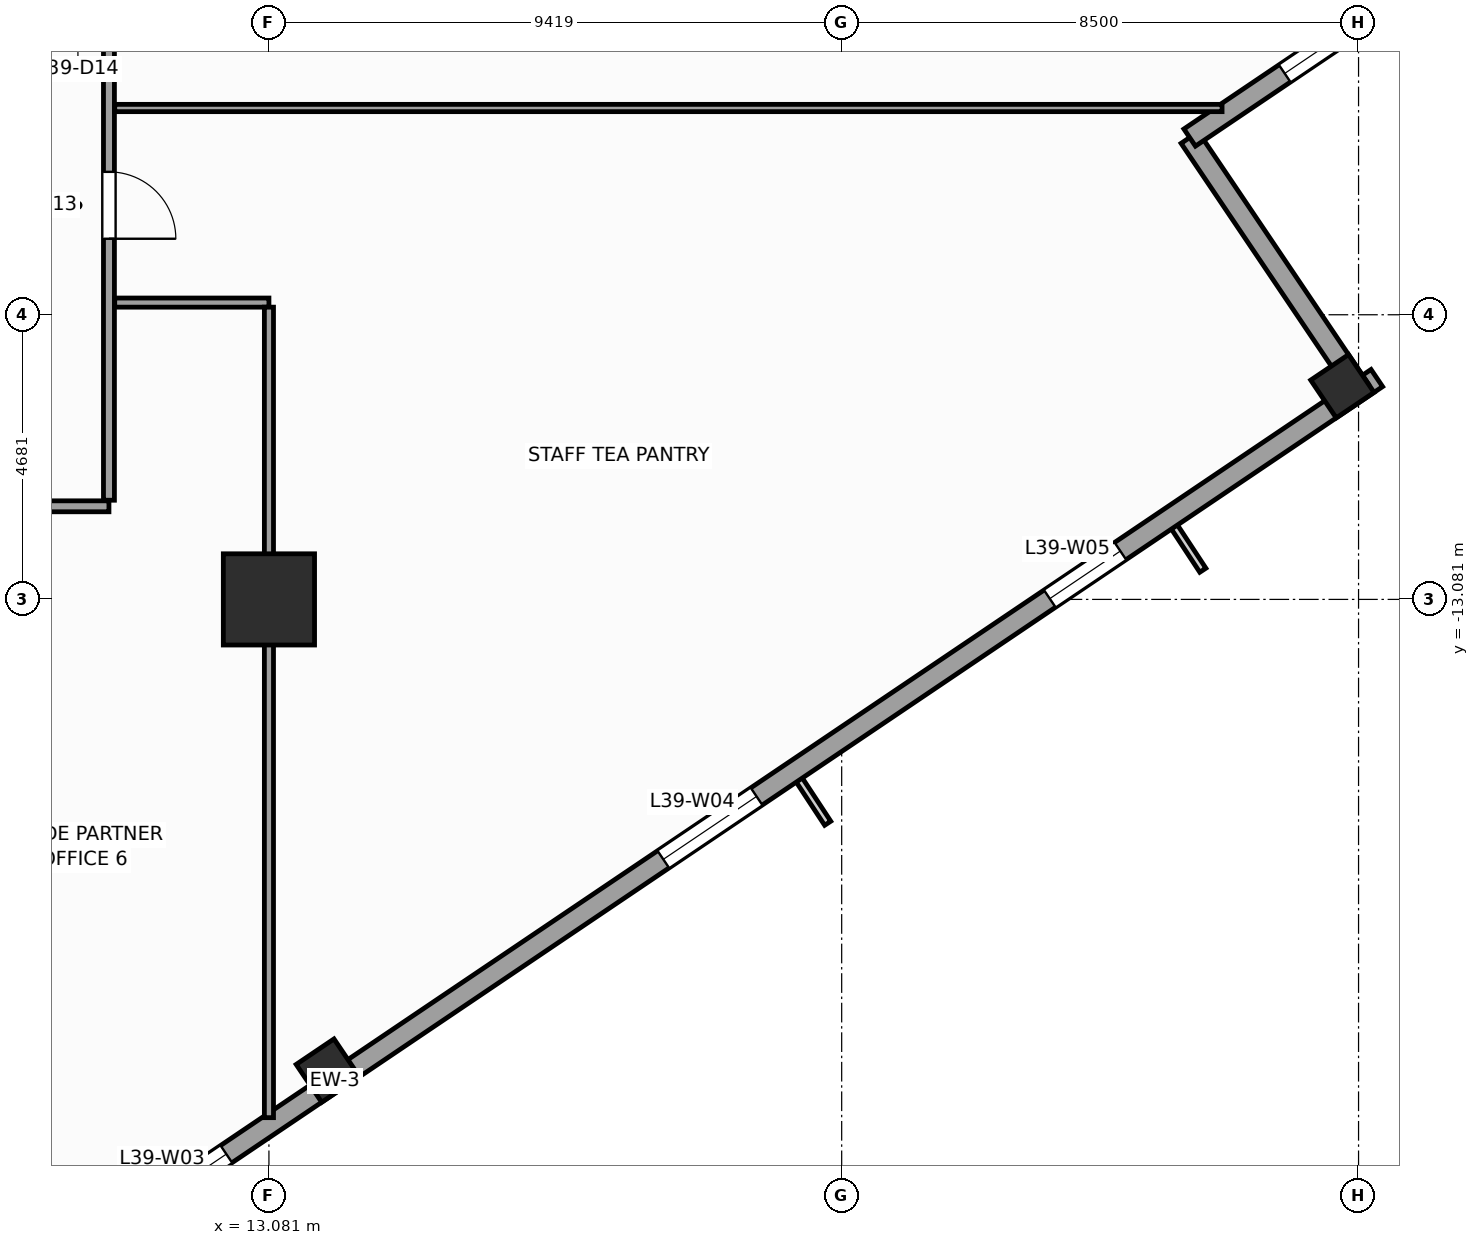
"""IFC4 building model, lengths in metres.
Left out: names, types, materials, properties, quantities, classifications, styles, units other than length and angle.
Written with IfcOpenShell. Run it as: python <this file> out.ifc"""

import sys

from ifc_helpers import new_model, si_unit, direction, frame, frame_2d, origin, origin_2d, place, context, subcontext, project, spatial, rectangle, extrude, source, transform, mapped, element, fill, save


model = new_model("IFC4")
c1 = context("Model", 3, precision=1e-05, world=origin(), true_north=direction((0.0, 1.0)))
c2 = subcontext(c1, "Body", "Model", "MODEL_VIEW")
j1 = project(units=[si_unit("LENGTHUNIT", "METRE"), si_unit("PLANEANGLEUNIT", "RADIAN")], contexts=[c1])
p1 = place(None, origin())
s1 = spatial("IfcSite", under=j1, at=p1, CompositionType="ELEMENT")
p2 = place(p1, origin())
s2 = spatial("IfcBuilding", under=s1, at=p2, CompositionType="ELEMENT")
p3 = place(p2, frame((0.0, 0.0, 164.4)))
s3 = spatial("IfcBuildingStorey", under=s2, at=p3, CompositionType="ELEMENT", Elevation=164.4)
m1 = source(origin(), c2, "Body", "SweptSolid", [
    extrude(rectangle(XDim=1.5, YDim=1.5, at=origin_2d()), origin(), (0.0, 0.0, 1.0), 4.0),
])
p4 = place(p3, frame((13.081, -13.081, 0.0), z_axis=(0.0, 0.0, 1.0), x_axis=(1.0, 0.0, 0.0)))
e1 = element("IfcColumn", 1, at=p4, inside=s3, PredefinedType="COLUMN", context=c2, shape_type="MappedRepresentation", body=[
    mapped(m1, transform((0.0, 0.0, 0.0), scale=1.0)),
])
m2 = source(origin(), c2, "Body", "SweptSolid", [
    extrude(rectangle(XDim=0.75, YDim=0.75, at=origin_2d()), origin(), (0.0, 0.0, 1.0), 4.0),
])
for number, where, z_axis, x_axis in (
    (2, (14.05, -20.83, 0.0), (0.0, 0.0, 1.0), (0.829, 0.559, 0.0)),
    (3, (30.734, -9.576, 0.0), (0.0, 0.0, 1.0), (0.829, 0.559, 0.0)),
):
    element("IfcColumn", number, at=place(p3, frame(where, z_axis=z_axis, x_axis=x_axis)), inside=s3, PredefinedType="COLUMN", context=c2, shape_type="MappedRepresentation", body=[
        mapped(m2, transform((0.0, 0.0, 0.0), scale=1.0)),
    ])
p5 = place(p3, frame((-2.972, -32.558, 0.0), z_axis=(0.0, 0.0, 1.0), x_axis=(0.829036218961, 0.559194910251, 0.0)))
e4 = element("IfcWall", 4, at=p5, inside=s3, PredefinedType="STANDARD", context=c2, shape_type="SweptSolid", body=[
    extrude(rectangle(XDim=41.34, YDim=0.34, at=frame_2d((20.67, 0.0))), origin(), (0.0, 0.0, 1.0), 3.04),
])
p6 = place(p5, frame((14.545, 0.0, 0.0)))
e5 = element("IfcOpeningElement", 5, at=p6, cuts=e4, PredefinedType="OPENING", context=c2, shape_type="SweptSolid", body=[
    extrude(rectangle(XDim=1.05, YDim=2.25, at=frame_2d((0.525, 1.125))), frame((0.0, 0.18, 0.0), z_axis=(0.0, -1.0, 0.0), x_axis=(1.0, 0.0, 0.0)), (0.0, 0.0, 1.0), 0.36),
])
p7 = place(p5, frame((4.261, 0.0, 0.56)))
e6 = element("IfcOpeningElement", 6, at=p7, cuts=e4, PredefinedType="OPENING", context=c2, shape_type="SweptSolid", body=[
    extrude(rectangle(XDim=1.4, YDim=2.4, at=frame_2d((0.7, 1.2))), frame((0.0, 0.18, 0.0), z_axis=(0.0, -1.0, 0.0), x_axis=(1.0, 0.0, 0.0)), (0.0, 0.0, 1.0), 0.36),
])
p8 = place(p5, frame((9.564, 0.0, 0.61)))
e7 = element("IfcOpeningElement", 7, at=p8, cuts=e4, PredefinedType="OPENING", context=c2, shape_type="SweptSolid", body=[
    extrude(rectangle(XDim=1.85, YDim=2.35, at=frame_2d((0.925, 1.175))), frame((0.0, 0.18, 0.0), z_axis=(0.0, -1.0, 0.0), x_axis=(1.0, 0.0, 0.0)), (0.0, 0.0, 1.0), 0.36),
])
p9 = place(p5, frame((16.668, 0.0, 0.61)))
e8 = element("IfcOpeningElement", 8, at=p9, cuts=e4, PredefinedType="OPENING", context=c2, shape_type="SweptSolid", body=[
    extrude(rectangle(XDim=1.85, YDim=2.35, at=frame_2d((0.925, 1.175))), frame((0.0, 0.18, 0.0), z_axis=(0.0, -1.0, 0.0), x_axis=(1.0, 0.0, 0.0)), (0.0, 0.0, 1.0), 0.36),
])
p10 = place(p5, frame((27.186, 0.0, 0.61)))
e9 = element("IfcOpeningElement", 9, at=p10, cuts=e4, PredefinedType="OPENING", context=c2, shape_type="SweptSolid", body=[
    extrude(rectangle(XDim=1.85, YDim=2.35, at=frame_2d((0.925, 1.175))), frame((0.0, 0.18, 0.0), z_axis=(0.0, -1.0, 0.0), x_axis=(1.0, 0.0, 0.0)), (0.0, 0.0, 1.0), 0.36),
])
p11 = place(p5, frame((34.852, 0.0, 0.56)))
e10 = element("IfcOpeningElement", 10, at=p11, cuts=e4, PredefinedType="OPENING", context=c2, shape_type="SweptSolid", body=[
    extrude(rectangle(XDim=1.4, YDim=2.4, at=frame_2d((0.7, 1.2))), frame((0.0, 0.18, 0.0), z_axis=(0.0, -1.0, 0.0), x_axis=(1.0, 0.0, 0.0)), (0.0, 0.0, 1.0), 0.36),
])
p12 = place(p3, frame((31.019, -9.631, 0.0), z_axis=(0.0, 0.0, 1.0), x_axis=(-0.559210350234, 0.829025804298, 0.0)))
e11 = element("IfcWall", 11, at=p12, inside=s3, PredefinedType="STANDARD", context=c2, shape_type="SweptSolid", body=[
    extrude(rectangle(XDim=5.0, YDim=0.34, at=frame_2d((2.5, 0.0))), origin(), (0.0, 0.0, 1.0), 3.74),
])
p13 = place(p3, frame((28.223, -5.486, 0.0), z_axis=(0.0, 0.0, 1.0), x_axis=(0.82905227345, 0.559171107879, 0.0)))
e12 = element("IfcWall", 12, at=p13, inside=s3, PredefinedType="STANDARD", context=c2, shape_type="SweptSolid", body=[
    extrude(rectangle(XDim=5.17, YDim=0.34, at=frame_2d((2.585, 0.0))), origin(), (0.0, 0.0, 1.0), 3.04),
])
p14 = place(p13, frame((1.885, 0.0, 0.56)))
e13 = element("IfcOpeningElement", 13, at=p14, cuts=e12, PredefinedType="OPENING", context=c2, shape_type="SweptSolid", body=[
    extrude(rectangle(XDim=1.4, YDim=2.4, at=frame_2d((0.7, 1.2))), frame((0.0, 0.18, 0.0), z_axis=(0.0, -1.0, 0.0), x_axis=(1.0, 0.0, 0.0)), (0.0, 0.0, 1.0), 0.36),
])
p15 = place(p3, frame((-11.55, -11.55, 0.0), z_axis=(0.0, 0.0, 1.0), x_axis=(1.0, 0.0, 0.0)))
e14 = element("IfcWall", 14, at=p15, inside=s3, PredefinedType="PARTITIONING", context=c2, shape_type="SweptSolid", body=[
    extrude(rectangle(XDim=22.0, YDim=0.18, at=frame_2d((11.0, 0.0))), origin(), (0.0, 0.0, 1.0), 3.74),
])
p16 = place(p15, frame((1.58, 0.0, 0.0)))
e15 = element("IfcOpeningElement", 15, at=p16, cuts=e14, PredefinedType="OPENING", context=c2, shape_type="SweptSolid", body=[
    extrude(rectangle(XDim=0.95, YDim=2.1, at=frame_2d((0.475, 1.05))), frame((0.0, 0.1, 0.0), z_axis=(0.0, -1.0, 0.0), x_axis=(1.0, 0.0, 0.0)), (0.0, 0.0, 1.0), 0.2),
])
p17 = place(p15, frame((6.75, 0.0, 0.0)))
e16 = element("IfcOpeningElement", 16, at=p17, cuts=e14, PredefinedType="OPENING", context=c2, shape_type="SweptSolid", body=[
    extrude(rectangle(XDim=1.1, YDim=2.2, at=frame_2d((0.55, 1.1))), frame((0.0, 0.1, 0.0), z_axis=(0.0, -1.0, 0.0), x_axis=(1.0, 0.0, 0.0)), (0.0, 0.0, 1.0), 0.2),
])
p18 = place(p15, frame((11.25, 0.0, 0.0)))
e17 = element("IfcOpeningElement", 17, at=p18, cuts=e14, PredefinedType="OPENING", context=c2, shape_type="SweptSolid", body=[
    extrude(rectangle(XDim=1.1, YDim=2.2, at=frame_2d((0.55, 1.1))), frame((0.0, 0.1, 0.0), z_axis=(0.0, -1.0, 0.0), x_axis=(1.0, 0.0, 0.0)), (0.0, 0.0, 1.0), 0.2),
])
p19 = place(p15, frame((15.75, 0.0, 0.0)))
e18 = element("IfcOpeningElement", 18, at=p19, cuts=e14, PredefinedType="OPENING", context=c2, shape_type="SweptSolid", body=[
    extrude(rectangle(XDim=1.1, YDim=2.2, at=frame_2d((0.55, 1.1))), frame((0.0, 0.1, 0.0), z_axis=(0.0, -1.0, 0.0), x_axis=(1.0, 0.0, 0.0)), (0.0, 0.0, 1.0), 0.2),
])
p20 = place(p15, frame((19.561, 0.0, 0.0)))
e19 = element("IfcOpeningElement", 19, at=p20, cuts=e14, PredefinedType="OPENING", context=c2, shape_type="SweptSolid", body=[
    extrude(rectangle(XDim=1.1, YDim=2.2, at=frame_2d((0.55, 1.1))), frame((0.0, 0.1, 0.0), z_axis=(0.0, -1.0, 0.0), x_axis=(1.0, 0.0, 0.0)), (0.0, 0.0, 1.0), 0.2),
])
p21 = place(p3, frame((10.45, -11.45, 0.0), z_axis=(0.0, 0.0, 1.0), x_axis=(0.0, 1.0, 0.0)))
e20 = element("IfcWall", 20, at=p21, inside=s3, PredefinedType="PARTITIONING", context=c2, shape_type="SweptSolid", body=[
    extrude(rectangle(XDim=10.05, YDim=0.18, at=frame_2d((5.025, 0.0))), origin(), (0.0, 0.0, 1.0), 3.74),
])
p22 = place(p21, frame((4.3, 0.0, 0.0)))
e21 = element("IfcOpeningElement", 21, at=p22, cuts=e20, PredefinedType="OPENING", context=c2, shape_type="SweptSolid", body=[
    extrude(rectangle(XDim=1.1, YDim=2.2, at=frame_2d((0.55, 1.1))), frame((0.0, 0.1, 0.0), z_axis=(0.0, -1.0, 0.0), x_axis=(1.0, 0.0, 0.0)), (0.0, 0.0, 1.0), 0.2),
])
p23 = place(p21, frame((7.536, 0.0, 0.0)))
e22 = element("IfcOpeningElement", 22, at=p23, cuts=e20, PredefinedType="OPENING", context=c2, shape_type="SweptSolid", body=[
    extrude(rectangle(XDim=1.1, YDim=2.2, at=frame_2d((0.55, 1.1))), frame((0.0, 0.1, 0.0), z_axis=(0.0, -1.0, 0.0), x_axis=(1.0, 0.0, 0.0)), (0.0, 0.0, 1.0), 0.2),
])
p24 = place(p3, frame((10.545, -8.2, 0.0), z_axis=(0.0, 0.0, 1.0), x_axis=(1.0, 0.0, 0.0)))
e23 = element("IfcWall", 23, at=p24, inside=s3, PredefinedType="PARTITIONING", context=c2, shape_type="SweptSolid", body=[
    extrude(rectangle(XDim=2.536, YDim=0.15, at=frame_2d((1.268, 0.0))), origin(), (0.0, 0.0, 1.0), 3.74),
])
p25 = place(p3, frame((13.081, -8.275, 0.0), z_axis=(0.0, 0.0, 1.0), x_axis=(0.0, -1.0, 0.0)))
e24 = element("IfcWall", 24, at=p25, inside=s3, PredefinedType="PARTITIONING", context=c2, shape_type="SweptSolid", body=[
    extrude(rectangle(XDim=13.329, YDim=0.15, at=frame_2d((6.664, 0.0))), origin(), (0.0, 0.0, 1.0), 2.84),
])
p26 = place(p3, frame((10.545, -5.0, 0.0), z_axis=(0.0, 0.0, 1.0), x_axis=(1.0, 0.0, 0.0)))
e25 = element("IfcWall", 25, at=p26, inside=s3, PredefinedType="PARTITIONING", context=c2, shape_type="SweptSolid", body=[
    extrude(rectangle(XDim=18.21, YDim=0.12, at=frame_2d((9.105, 0.0))), origin(), (0.0, 0.0, 1.0), 3.74),
])
m3 = source(origin(), c2, "Body", "SweptSolid", [
    extrude(rectangle(XDim=1.85, YDim=2.35, at=frame_2d((0.925, 1.175))), frame((0.0, 0.03, 0.0), z_axis=(0.0, -1.0, 0.0), x_axis=(1.0, 0.0, 0.0)), (0.0, 0.0, 1.0), 0.06),
])
p27 = place(p9, origin())
e26 = element("IfcWindow", 26, at=p27, inside=s3, PartitioningType="SINGLE_PANEL", PredefinedType="WINDOW", context=c2, shape_type="MappedRepresentation", body=[
    mapped(m3, transform((0.0, 0.0, 0.0), scale=1.0)),
])
fill(e8, e26)
p28 = place(p10, origin())
e27 = element("IfcWindow", 27, at=p28, inside=s3, PartitioningType="SINGLE_PANEL", PredefinedType="WINDOW", context=c2, shape_type="MappedRepresentation", body=[
    mapped(m3, transform((0.0, 0.0, 0.0), scale=1.0)),
])
fill(e9, e27)
m4 = source(origin(), c2, "Body", "SweptSolid", [
    extrude(rectangle(XDim=1.4, YDim=2.4, at=frame_2d((0.7, 1.2))), frame((0.0, 0.03, 0.0), z_axis=(0.0, -1.0, 0.0), x_axis=(1.0, 0.0, 0.0)), (0.0, 0.0, 1.0), 0.06),
])
p29 = place(p11, origin())
e28 = element("IfcWindow", 28, at=p29, inside=s3, PartitioningType="SINGLE_PANEL", PredefinedType="WINDOW", context=c2, shape_type="MappedRepresentation", body=[
    mapped(m4, transform((0.0, 0.0, 0.0), scale=1.0)),
])
fill(e10, e28)
p30 = place(p14, origin())
e29 = element("IfcWindow", 29, at=p30, inside=s3, PartitioningType="SINGLE_PANEL", PredefinedType="WINDOW", context=c2, shape_type="MappedRepresentation", body=[
    mapped(m4, transform((0.0, 0.0, 0.0), scale=1.0)),
])
fill(e13, e29)
m5 = source(origin(), c2, "Body", "SweptSolid", [
    extrude(rectangle(XDim=1.1, YDim=2.2, at=frame_2d((0.55, 1.1))), frame((0.0, 0.025, 0.0), z_axis=(0.0, -1.0, 0.0), x_axis=(1.0, 0.0, 0.0)), (0.0, 0.0, 1.0), 0.05),
])
p31 = place(p22, frame((1.1, 0.0, 0.0), z_axis=(0.0, 0.0, 1.0), x_axis=(-1.0, 0.0, 0.0)))
e30 = element("IfcDoor", 30, at=p31, inside=s3, OperationType="SINGLE_SWING_LEFT", PredefinedType="DOOR", context=c2, shape_type="MappedRepresentation", body=[
    mapped(m5, transform((0.0, 0.0, 0.0), scale=1.0)),
])
fill(e21, e30)
save(model, sys.argv[1])
